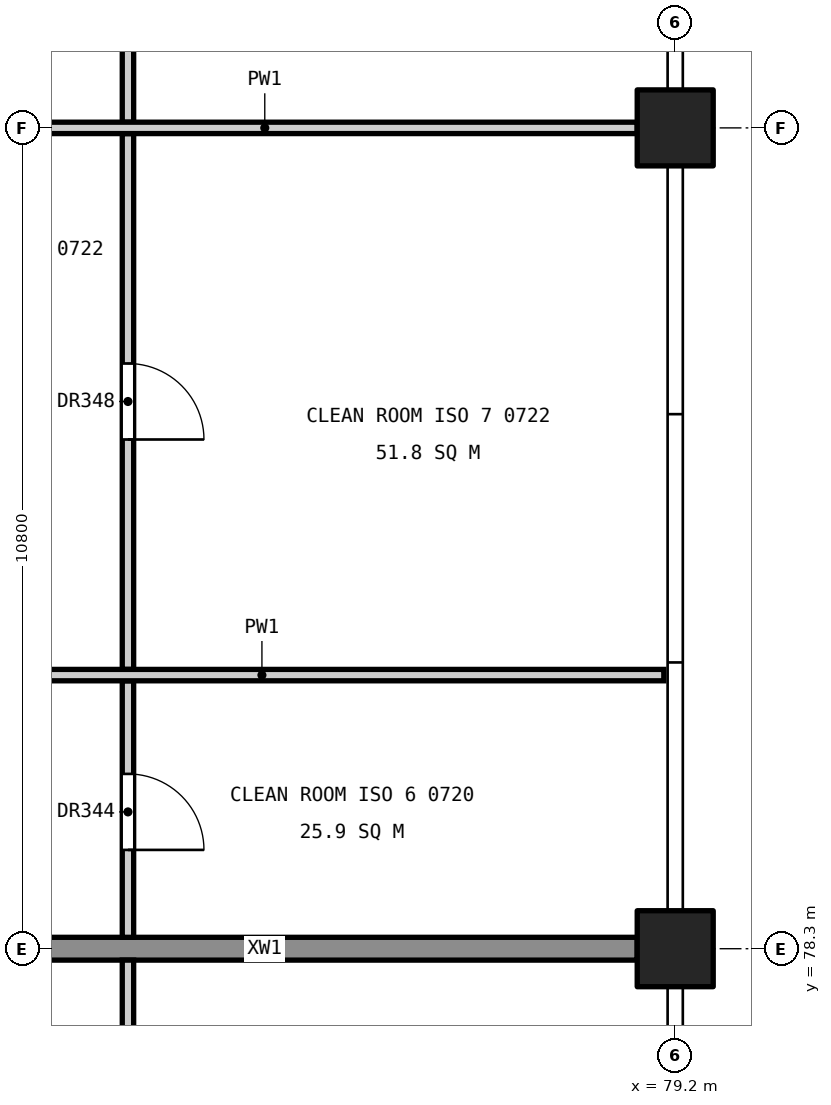
"""IFC4 building model, lengths in metres.
Left out: names, types, materials, properties, quantities, classifications, styles, units other than length and angle.
Written with IfcOpenShell. Run it as: python <this file> out.ifc"""

import sys

from ifc_helpers import new_model, si_unit, direction, frame, frame_2d, origin, origin_2d, place, context, subcontext, project, spatial, rectangle, extrude, element, fill, save


model = new_model("IFC4")
c1 = context("Model", 3, precision=1e-05, world=origin(), true_north=direction((0.0, 1.0)))
c2 = subcontext(c1, "Body", "Model", "MODEL_VIEW")
j1 = project(units=[si_unit("LENGTHUNIT", "METRE"), si_unit("PLANEANGLEUNIT", "RADIAN")], contexts=[c1])
p1 = place(None, origin())
s1 = spatial("IfcSite", under=j1, at=p1, CompositionType="ELEMENT")
p2 = place(p1, origin())
s2 = spatial("IfcBuilding", under=s1, at=p2, CompositionType="ELEMENT")
p3 = place(p2, frame((0.0, 0.0, 36.6)))
s3 = spatial("IfcBuildingStorey", under=s2, at=p3, CompositionType="ELEMENT", Elevation=36.6)
for number, where, z_axis, x_axis in (
    (1, (79.2, 78.3, 0.0), (0.0, 0.0, 1.0), (1.0, 0.0, 0.0)),
    (2, (79.2, 89.1, 0.0), (0.0, 0.0, 1.0), (1.0, 0.0, 0.0)),
):
    element("IfcColumn", number, at=place(p3, frame(where, z_axis=z_axis, x_axis=x_axis)), inside=s3, PredefinedType="COLUMN", context=c2, shape_type="SweptSolid", body=[
        extrude(rectangle(XDim=1.0, YDim=1.0, at=origin_2d()), origin(), (0.0, 0.0, 1.0), 4.8),
    ])
p4 = place(p3, frame((68.9, 78.3, 0.0), z_axis=(0.0, 0.0, 1.0), x_axis=(1.0, 0.0, 0.0)))
e3 = element("IfcWall", 3, at=p4, inside=s3, PredefinedType="SHEAR", context=c2, shape_type="SweptSolid", body=[
    extrude(rectangle(XDim=9.8, YDim=0.3, at=frame_2d((4.9, 0.0))), origin(), (0.0, 0.0, 1.0), 4.55),
])
p5 = place(p3, frame((72.0, 56.85, 0.0), z_axis=(0.0, 0.0, 1.0), x_axis=(0.0, 1.0, 0.0)))
e4 = element("IfcWall", 4, at=p5, inside=s3, PredefinedType="PARTITIONING", context=c2, shape_type="SweptSolid", body=[
    extrude(rectangle(XDim=21.3, YDim=0.15, at=frame_2d((10.65, 0.0))), origin(), (0.0, 0.0, 1.0), 3.55),
])
p6 = place(p5, frame((10.15, 0.0, 0.0)))
e5 = element("IfcOpeningElement", 5, at=p6, cuts=e4, PredefinedType="OPENING", context=c2, shape_type="SweptSolid", body=[
    extrude(rectangle(XDim=1.0, YDim=2.1, at=frame_2d((0.5, 1.05))), frame((0.0, 0.085, 0.0), z_axis=(0.0, -1.0, 0.0), x_axis=(1.0, 0.0, 0.0)), (0.0, 0.0, 1.0), 0.17),
])
p7 = place(p3, frame((72.0, 78.45, 0.0), z_axis=(0.0, 0.0, 1.0), x_axis=(0.0, 1.0, 0.0)))
e6 = element("IfcWall", 6, at=p7, inside=s3, PredefinedType="PARTITIONING", context=c2, shape_type="SweptSolid", body=[
    extrude(rectangle(XDim=3.375, YDim=0.15, at=frame_2d((1.688, 0.0))), origin(), (0.0, 0.0, 1.0), 3.55),
])
p8 = place(p7, frame((1.15, 0.0, 0.0)))
e7 = element("IfcOpeningElement", 7, at=p8, cuts=e6, PredefinedType="OPENING", context=c2, shape_type="SweptSolid", body=[
    extrude(rectangle(XDim=1.0, YDim=2.1, at=frame_2d((0.5, 1.05))), frame((0.0, 0.085, 0.0), z_axis=(0.0, -1.0, 0.0), x_axis=(1.0, 0.0, 0.0)), (0.0, 0.0, 1.0), 0.17),
])
p9 = place(p3, frame((72.0, 81.975, 0.0), z_axis=(0.0, 0.0, 1.0), x_axis=(0.0, 1.0, 0.0)))
e8 = element("IfcWall", 8, at=p9, inside=s3, PredefinedType="PARTITIONING", context=c2, shape_type="SweptSolid", body=[
    extrude(rectangle(XDim=7.05, YDim=0.15, at=frame_2d((3.525, 0.0))), origin(), (0.0, 0.0, 1.0), 3.55),
])
p10 = place(p9, frame((3.025, 0.0, 0.0)))
e9 = element("IfcOpeningElement", 9, at=p10, cuts=e8, PredefinedType="OPENING", context=c2, shape_type="SweptSolid", body=[
    extrude(rectangle(XDim=1.0, YDim=2.1, at=frame_2d((0.5, 1.05))), frame((0.0, 0.085, 0.0), z_axis=(0.0, -1.0, 0.0), x_axis=(1.0, 0.0, 0.0)), (0.0, 0.0, 1.0), 0.17),
])
p11 = place(p3, frame((72.0, 89.175, 0.0), z_axis=(0.0, 0.0, 1.0), x_axis=(0.0, 1.0, 0.0)))
e10 = element("IfcWall", 10, at=p11, inside=s3, PredefinedType="PARTITIONING", context=c2, shape_type="SweptSolid", body=[
    extrude(rectangle(XDim=10.575, YDim=0.15, at=frame_2d((5.288, 0.0))), origin(), (0.0, 0.0, 1.0), 3.55),
])
p12 = place(p11, frame((4.825, 0.0, 0.0)))
e11 = element("IfcOpeningElement", 11, at=p12, cuts=e10, PredefinedType="OPENING", context=c2, shape_type="SweptSolid", body=[
    extrude(rectangle(XDim=1.0, YDim=2.1, at=frame_2d((0.5, 1.05))), frame((0.0, 0.085, 0.0), z_axis=(0.0, -1.0, 0.0), x_axis=(1.0, 0.0, 0.0)), (0.0, 0.0, 1.0), 0.17),
])
p13 = place(p3, frame((68.475, 81.9, 0.0), z_axis=(0.0, 0.0, 1.0), x_axis=(1.0, 0.0, 0.0)))
e12 = element("IfcWall", 12, at=p13, inside=s3, PredefinedType="PARTITIONING", context=c2, shape_type="SweptSolid", body=[
    extrude(rectangle(XDim=10.575, YDim=0.15, at=frame_2d((5.288, 0.0))), origin(), (0.0, 0.0, 1.0), 3.85),
])
p14 = place(p3, frame((68.9, 89.1, 0.0), z_axis=(0.0, 0.0, 1.0), x_axis=(1.0, 0.0, 0.0)))
e13 = element("IfcWall", 13, at=p14, inside=s3, PredefinedType="PARTITIONING", context=c2, shape_type="SweptSolid", body=[
    extrude(rectangle(XDim=9.8, YDim=0.15, at=frame_2d((4.9, 0.0))), origin(), (0.0, 0.0, 1.0), 3.85),
])
p15 = place(p8, frame((1.0, 0.0, 0.0), z_axis=(0.0, 0.0, 1.0), x_axis=(-1.0, 0.0, 0.0)))
e14 = element("IfcDoor", 14, at=p15, inside=s3, OperationType="SINGLE_SWING_RIGHT", PredefinedType="DOOR", context=c2, shape_type="SweptSolid", body=[
    extrude(rectangle(XDim=1.0, YDim=2.1, at=frame_2d((0.5, 1.05))), frame((0.0, 0.025, 0.0), z_axis=(0.0, -1.0, 0.0), x_axis=(1.0, 0.0, 0.0)), (0.0, 0.0, 1.0), 0.05),
])
fill(e7, e14)
p16 = place(p10, frame((1.0, 0.0, 0.0), z_axis=(0.0, 0.0, 1.0), x_axis=(-1.0, 0.0, 0.0)))
e15 = element("IfcDoor", 15, at=p16, inside=s3, OperationType="SINGLE_SWING_RIGHT", PredefinedType="DOOR", context=c2, shape_type="SweptSolid", body=[
    extrude(rectangle(XDim=1.0, YDim=2.1, at=frame_2d((0.5, 1.05))), frame((0.0, 0.025, 0.0), z_axis=(0.0, -1.0, 0.0), x_axis=(1.0, 0.0, 0.0)), (0.0, 0.0, 1.0), 0.05),
])
fill(e9, e15)
save(model, sys.argv[1])
